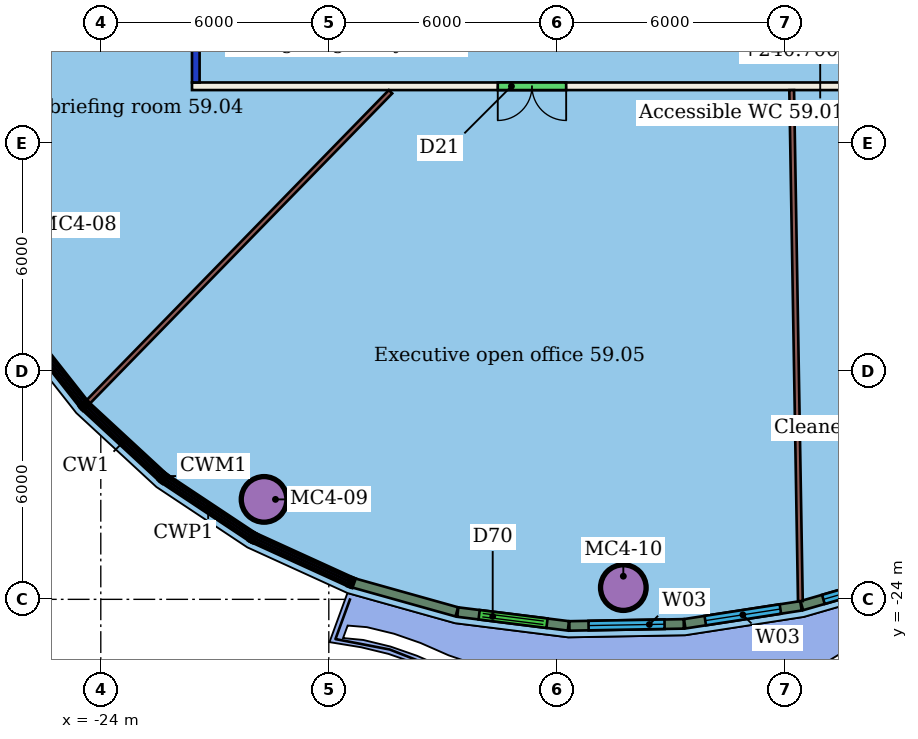
"""IFC4 building model, lengths in metres.
Left out: names, types, materials, properties, quantities, classifications, styles, units other than length and angle.
Written with IfcOpenShell. Run it as: python <this file> out.ifc"""

import sys

from ifc_helpers import new_model, si_unit, direction, frame, frame_2d, origin, origin_2d, place, context, subcontext, project, spatial, rectangle, hollow_circle, extrude, element, fill, save


model = new_model("IFC4")
c1 = context("Model", 3, precision=1e-05, world=origin(), true_north=direction((0.0, 1.0)))
c2 = subcontext(c1, "Body", "Model", "MODEL_VIEW")
j1 = project(units=[si_unit("LENGTHUNIT", "METRE"), si_unit("PLANEANGLEUNIT", "RADIAN")], contexts=[c1])
p1 = place(None, origin())
s1 = spatial("IfcSite", under=j1, at=p1, CompositionType="ELEMENT")
p2 = place(p1, origin())
s2 = spatial("IfcBuilding", under=s1, at=p2, CompositionType="ELEMENT")
p3 = place(p2, frame((0.0, 0.0, 238.9)))
s3 = spatial("IfcBuildingStorey", under=s2, at=p3, CompositionType="ELEMENT", Elevation=238.9)
for number, where, z_axis, x_axis in (
    (1, (-19.704, -21.37, 0.0), (0.0, 0.0, 1.0), (1.0, 0.0, 0.0)),
    (2, (-10.25, -23.691, 0.0), (0.0, 0.0, 1.0), (1.0, 0.0, 0.0)),
):
    element("IfcColumn", number, at=place(p3, frame(where, z_axis=z_axis, x_axis=x_axis)), inside=s3, PredefinedType="COLUMN", context=c2, shape_type="SweptSolid", body=[
        extrude(hollow_circle(Radius=0.6, WallThickness=0.045, at=origin_2d()), origin(), (0.0, 0.0, 1.0), 3.4),
    ])
p4 = place(p3, frame((9.6, -10.5, 0.0), z_axis=(0.0, 0.0, 1.0), x_axis=(-1.0, 0.0, 0.0)))
e3 = element("IfcWall", 3, at=p4, inside=s3, PredefinedType="PARTITIONING", context=c2, shape_type="SweptSolid", body=[
    extrude(rectangle(XDim=31.2, YDim=0.2, at=frame_2d((15.6, 0.0))), origin(), (0.0, 0.0, 1.0), 3.4),
])
p5 = place(p4, frame((21.354, 0.0, 0.0)))
e4 = element("IfcOpeningElement", 4, at=p5, cuts=e3, PredefinedType="OPENING", context=c2, shape_type="SweptSolid", body=[
    extrude(rectangle(XDim=1.8, YDim=2.1, at=frame_2d((0.9, 1.05))), frame((0.0, 0.11, 0.0), z_axis=(0.0, -1.0, 0.0), x_axis=(1.0, 0.0, 0.0)), (0.0, 0.0, 1.0), 0.22),
])
p6 = place(p4, frame((9.369, 0.0, 0.0)))
e5 = element("IfcOpeningElement", 5, at=p6, cuts=e3, PredefinedType="OPENING", context=c2, shape_type="SweptSolid", body=[
    extrude(rectangle(XDim=1.8, YDim=2.1, at=frame_2d((0.9, 1.05))), frame((0.0, 0.11, 0.0), z_axis=(0.0, -1.0, 0.0), x_axis=(1.0, 0.0, 0.0)), (0.0, 0.0, 1.0), 0.22),
])
p7 = place(p3, frame((-21.5, -10.4, 0.0), z_axis=(0.0, 0.0, 1.0), x_axis=(0.0, 1.0, 0.0)))
e6 = element("IfcWall", 6, at=p7, inside=s3, PredefinedType="PARTITIONING", context=c2, shape_type="SweptSolid", body=[
    extrude(rectangle(XDim=20.8, YDim=0.2, at=frame_2d((10.4, 0.0))), origin(), (0.0, 0.0, 1.0), 3.0),
])
p8 = place(p7, frame((13.367, 0.0, 0.0)))
e7 = element("IfcOpeningElement", 7, at=p8, cuts=e6, PredefinedType="OPENING", context=c2, shape_type="SweptSolid", body=[
    extrude(rectangle(XDim=1.2, YDim=2.4, at=frame_2d((0.6, 1.2))), frame((0.0, 0.11, 0.0), z_axis=(0.0, -1.0, 0.0), x_axis=(1.0, 0.0, 0.0)), (0.0, 0.0, 1.0), 0.22),
])
p9 = place(p7, frame((6.326, 0.0, 0.0)))
e8 = element("IfcOpeningElement", 8, at=p9, cuts=e6, PredefinedType="OPENING", context=c2, shape_type="SweptSolid", body=[
    extrude(rectangle(XDim=1.8, YDim=2.4, at=frame_2d((0.9, 1.2))), frame((0.0, 0.11, 0.0), z_axis=(0.0, -1.0, 0.0), x_axis=(1.0, 0.0, 0.0)), (0.0, 0.0, 1.0), 0.22),
])
p10 = place(p3, frame((-24.333, -18.807, 0.0), z_axis=(0.0, 0.0, 1.0), x_axis=(0.698033160895, 0.716065434364, 0.0)))
e9 = element("IfcWall", 9, at=p10, inside=s3, PredefinedType="PARTITIONING", context=c2, shape_type="SweptSolid", body=[
    extrude(rectangle(XDim=11.4, YDim=0.125, at=frame_2d((5.7, 0.0))), origin(), (0.0, 0.0, 1.0), 3.4),
])
p11 = place(p3, frame((-5.591, -24.047, 0.0), z_axis=(0.0, 0.0, 1.0), x_axis=(-0.016992861456, 0.999855610906, 0.0)))
e10 = element("IfcWall", 10, at=p11, inside=s3, PredefinedType="PARTITIONING", context=c2, shape_type="SweptSolid", body=[
    extrude(rectangle(XDim=13.448, YDim=0.125, at=frame_2d((6.724, 0.0))), origin(), (0.0, 0.0, 1.0), 3.4),
])
p12 = place(p3, frame((-17.354, -23.567, 0.0), z_axis=(0.0, 0.0, 1.0), x_axis=(0.962900295721, -0.269857407718, 0.0)))
e11 = element("IfcWall", 11, at=p12, inside=s3, PredefinedType="SOLIDWALL", context=c2, shape_type="SweptSolid", body=[
    extrude(rectangle(XDim=2.826, YDim=0.25, at=frame_2d((1.413, 0.0))), origin(), (0.0, 0.0, 1.0), 3.05),
])
p13 = place(p3, frame((-14.606, -24.335, 0.0), z_axis=(0.0, 0.0, 1.0), x_axis=(0.992289397798, -0.123942531107, 0.0)))
e12 = element("IfcWall", 12, at=p13, inside=s3, PredefinedType="SOLIDWALL", context=c2, shape_type="SweptSolid", body=[
    extrude(rectangle(XDim=2.933, YDim=0.25, at=frame_2d((1.467, 0.0))), origin(), (0.0, 0.0, 1.0), 3.05),
])
p14 = place(p13, frame((0.566, 0.0, 0.0)))
e13 = element("IfcOpeningElement", 13, at=p14, cuts=e12, PredefinedType="OPENING", context=c2, shape_type="SweptSolid", body=[
    extrude(rectangle(XDim=1.8, YDim=2.4, at=frame_2d((0.9, 1.2))), frame((0.0, 0.135, 0.0), z_axis=(0.0, -1.0, 0.0), x_axis=(1.0, 0.0, 0.0)), (0.0, 0.0, 1.0), 0.27),
])
p15 = place(p3, frame((-11.67, -24.7, 0.0), z_axis=(0.0, 0.0, 1.0), x_axis=(0.999837951795, 0.018001948524, 0.0)))
e14 = element("IfcWall", 14, at=p15, inside=s3, PredefinedType="SOLIDWALL", context=c2, shape_type="SweptSolid", body=[
    extrude(rectangle(XDim=3.011, YDim=0.25, at=frame_2d((1.505, 0.0))), origin(), (0.0, 0.0, 1.0), 3.05),
])
p16 = place(p15, frame((0.505, 0.0, 0.9)))
e15 = element("IfcOpeningElement", 15, at=p16, cuts=e14, PredefinedType="OPENING", context=c2, shape_type="SweptSolid", body=[
    extrude(rectangle(XDim=2.0, YDim=2.1, at=frame_2d((1.0, 1.05))), frame((0.0, 0.135, 0.0), z_axis=(0.0, -1.0, 0.0), x_axis=(1.0, 0.0, 0.0)), (0.0, 0.0, 1.0), 0.27),
])
p17 = place(p3, frame((-8.635, -24.643, 0.0), z_axis=(0.0, 0.0, 1.0), x_axis=(0.988271174428, 0.152709154258, 0.0)))
e16 = element("IfcWall", 16, at=p17, inside=s3, PredefinedType="SOLIDWALL", context=c2, shape_type="SweptSolid", body=[
    extrude(rectangle(XDim=3.095, YDim=0.25, at=frame_2d((1.548, 0.0))), origin(), (0.0, 0.0, 1.0), 3.05),
])
p18 = place(p17, frame((0.548, 0.0, 0.9)))
e17 = element("IfcOpeningElement", 17, at=p18, cuts=e16, PredefinedType="OPENING", context=c2, shape_type="SweptSolid", body=[
    extrude(rectangle(XDim=2.0, YDim=2.1, at=frame_2d((1.0, 1.05))), frame((0.0, 0.135, 0.0), z_axis=(0.0, -1.0, 0.0), x_axis=(1.0, 0.0, 0.0)), (0.0, 0.0, 1.0), 0.27),
])
p19 = place(p3, frame((-5.553, -24.166, 0.0), z_axis=(0.0, 0.0, 1.0), x_axis=(0.960582609331, 0.277994695364, 0.0)))
e18 = element("IfcWall", 18, at=p19, inside=s3, PredefinedType="SOLIDWALL", context=c2, shape_type="SweptSolid", body=[
    extrude(rectangle(XDim=3.18, YDim=0.25, at=frame_2d((1.59, 0.0))), origin(), (0.0, 0.0, 1.0), 3.05),
])
p20 = place(p19, frame((0.59, 0.0, 0.9)))
e19 = element("IfcOpeningElement", 19, at=p20, cuts=e18, PredefinedType="OPENING", context=c2, shape_type="SweptSolid", body=[
    extrude(rectangle(XDim=2.0, YDim=2.1, at=frame_2d((1.0, 1.05))), frame((0.0, 0.135, 0.0), z_axis=(0.0, -1.0, 0.0), x_axis=(1.0, 0.0, 0.0)), (0.0, 0.0, 1.0), 0.27),
])
p21 = place(p5, origin())
e20 = element("IfcDoor", 20, at=p21, inside=s3, OperationType="DOUBLE_DOOR_SINGLE_SWING", PredefinedType="DOOR", context=c2, shape_type="SweptSolid", body=[
    extrude(rectangle(XDim=1.8, YDim=2.1, at=frame_2d((0.9, 1.05))), frame((0.0, 0.025, 0.0), z_axis=(0.0, -1.0, 0.0), x_axis=(1.0, 0.0, 0.0)), (0.0, 0.0, 1.0), 0.05),
])
fill(e4, e20)
p22 = place(p14, origin())
e21 = element("IfcDoor", 21, at=p22, inside=s3, OperationType="DOUBLE_DOOR_SLIDING", PredefinedType="DOOR", context=c2, shape_type="SweptSolid", body=[
    extrude(rectangle(XDim=1.8, YDim=2.4, at=frame_2d((0.9, 1.2))), frame((0.0, 0.025, 0.0), z_axis=(0.0, -1.0, 0.0), x_axis=(1.0, 0.0, 0.0)), (0.0, 0.0, 1.0), 0.05),
])
fill(e13, e21)
p23 = place(p16, origin())
e22 = element("IfcWindow", 22, at=p23, inside=s3, PartitioningType="SINGLE_PANEL", PredefinedType="WINDOW", context=c2, shape_type="SweptSolid", body=[
    extrude(rectangle(XDim=2.0, YDim=2.1, at=frame_2d((1.0, 1.05))), frame((0.0, 0.03, 0.0), z_axis=(0.0, -1.0, 0.0), x_axis=(1.0, 0.0, 0.0)), (0.0, 0.0, 1.0), 0.06),
])
fill(e15, e22)
p24 = place(p18, origin())
e23 = element("IfcWindow", 23, at=p24, inside=s3, PartitioningType="SINGLE_PANEL", PredefinedType="WINDOW", context=c2, shape_type="SweptSolid", body=[
    extrude(rectangle(XDim=2.0, YDim=2.1, at=frame_2d((1.0, 1.05))), frame((0.0, 0.03, 0.0), z_axis=(0.0, -1.0, 0.0), x_axis=(1.0, 0.0, 0.0)), (0.0, 0.0, 1.0), 0.06),
])
fill(e17, e23)
p25 = place(p20, origin())
e24 = element("IfcWindow", 24, at=p25, inside=s3, PartitioningType="SINGLE_PANEL", PredefinedType="WINDOW", context=c2, shape_type="SweptSolid", body=[
    extrude(rectangle(XDim=2.0, YDim=2.1, at=frame_2d((1.0, 1.05))), frame((0.0, 0.03, 0.0), z_axis=(0.0, -1.0, 0.0), x_axis=(1.0, 0.0, 0.0)), (0.0, 0.0, 1.0), 0.06),
])
fill(e19, e24)
save(model, sys.argv[1])
